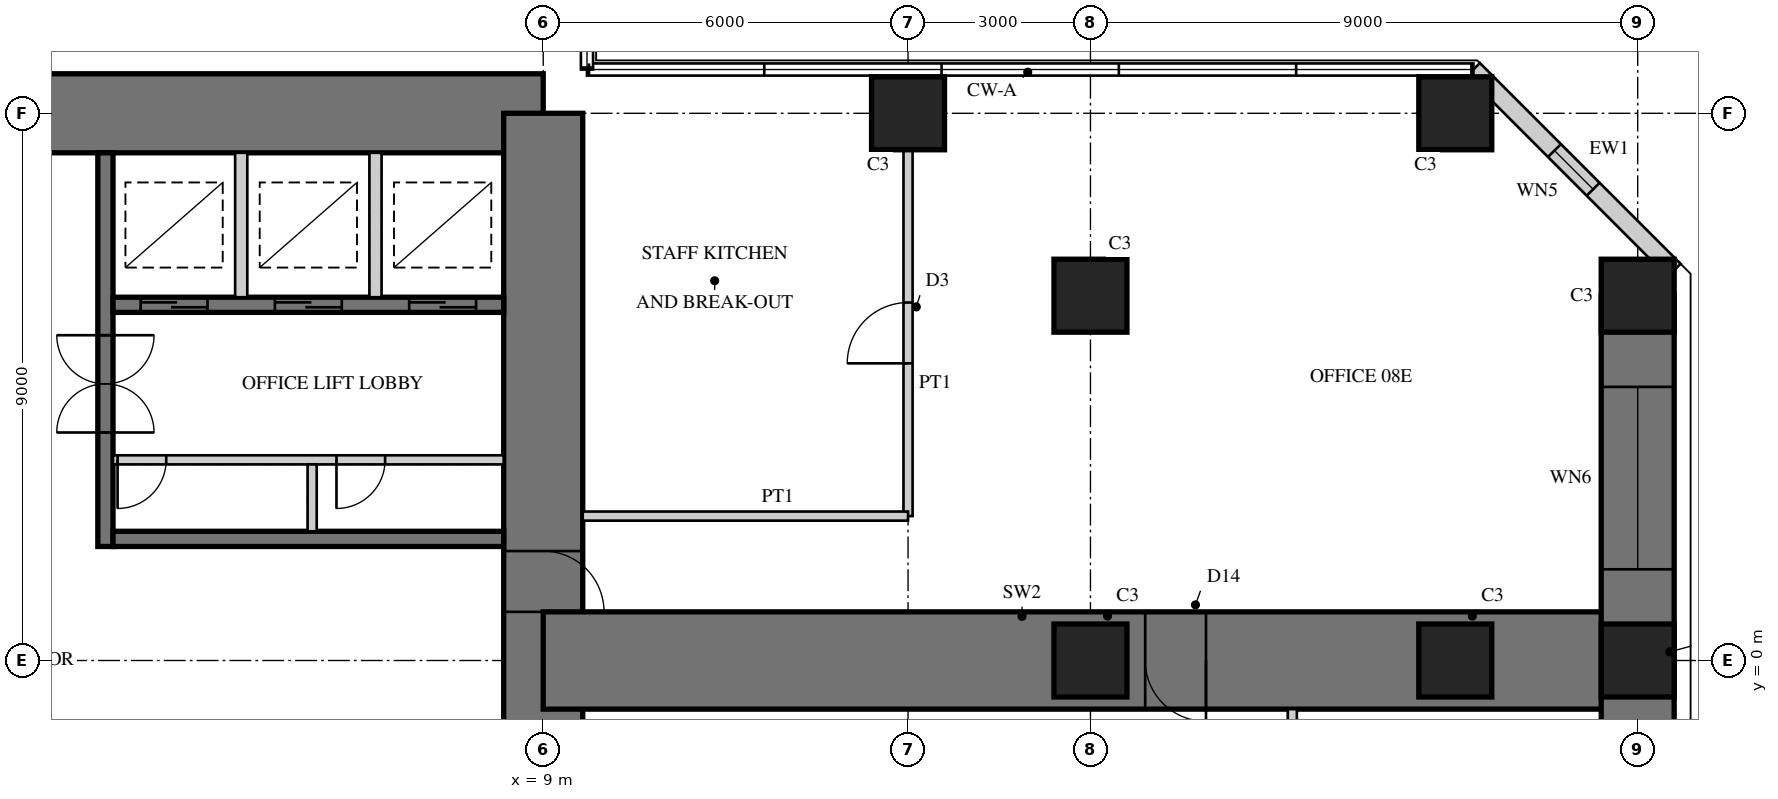
"""IFC4 building model, lengths in metres.
Left out: names, types, materials, properties, quantities, classifications, styles, units other than length and angle.
Written with IfcOpenShell. Run it as: python <this file> out.ifc"""

import sys

from ifc_helpers import new_model, si_unit, direction, frame, frame_2d, origin, origin_2d, place, context, subcontext, project, spatial, rectangle, hollow_rectangle, extrude, element, fill, save


model = new_model("IFC4")
c1 = context("Model", 3, precision=1e-05, world=origin(), true_north=direction((0.0, 1.0)))
c2 = subcontext(c1, "Body", "Model", "MODEL_VIEW")
j1 = project(units=[si_unit("LENGTHUNIT", "METRE"), si_unit("PLANEANGLEUNIT", "RADIAN")], contexts=[c1])
p1 = place(None, origin())
s1 = spatial("IfcSite", under=j1, at=p1, CompositionType="ELEMENT")
p2 = place(p1, origin())
s2 = spatial("IfcBuilding", under=s1, at=p2, CompositionType="ELEMENT")
p3 = place(p2, frame((0.0, 0.0, 35.5)))
s3 = spatial("IfcBuildingStorey", under=s2, at=p3, CompositionType="ELEMENT", Elevation=35.5)
p4 = place(p3, frame((9.0, 9.0, 0.0), z_axis=(0.0, 0.0, 1.0), x_axis=(-1.0, 0.0, 0.0)))
e1 = element("IfcWall", 1, at=p4, inside=s3, PredefinedType="SHEAR", context=c2, shape_type="SweptSolid", body=[
    extrude(rectangle(XDim=18.0, YDim=1.3, at=frame_2d((9.0, 0.0))), origin(), (0.0, 0.0, 1.0), 4.0),
])
p5 = place(p4, frame((9.8, 0.0, 0.0)))
e2 = element("IfcOpeningElement", 2, at=p5, cuts=e1, PredefinedType="OPENING", context=c2, shape_type="SweptSolid", body=[
    extrude(rectangle(XDim=1.0, YDim=2.4, at=frame_2d((0.5, 1.2))), frame((0.0, 0.66, 0.0), z_axis=(0.0, -1.0, 0.0), x_axis=(1.0, 0.0, 0.0)), (0.0, 0.0, 1.0), 1.32),
])
p6 = place(p3, frame((9.0, -9.0, 0.0), z_axis=(0.0, 0.0, 1.0), x_axis=(0.0, 1.0, 0.0)))
e3 = element("IfcWall", 3, at=p6, inside=s3, PredefinedType="SHEAR", context=c2, shape_type="SweptSolid", body=[
    extrude(rectangle(XDim=18.0, YDim=1.3, at=frame_2d((9.0, 0.0))), origin(), (0.0, 0.0, 1.0), 4.0),
])
p7 = place(p6, frame((9.8, 0.0, 0.0)))
e4 = element("IfcOpeningElement", 4, at=p7, cuts=e3, PredefinedType="OPENING", context=c2, shape_type="SweptSolid", body=[
    extrude(rectangle(XDim=1.0, YDim=2.4, at=frame_2d((0.5, 1.2))), frame((0.0, 0.66, 0.0), z_axis=(0.0, -1.0, 0.0), x_axis=(1.0, 0.0, 0.0)), (0.0, 0.0, 1.0), 1.32),
])
p8 = place(p3, frame((1.8, 1.875, 0.0), z_axis=(0.0, 0.0, 1.0), x_axis=(0.0, 1.0, 0.0)))
e5 = element("IfcWall", 5, at=p8, inside=s3, PredefinedType="SHEAR", context=c2, shape_type="SweptSolid", body=[
    extrude(rectangle(XDim=6.475, YDim=0.25, at=frame_2d((3.238, 0.0))), origin(), (0.0, 0.0, 1.0), 4.0),
])
p9 = place(p8, frame((1.875, 0.0, 0.0)))
e6 = element("IfcOpeningElement", 6, at=p9, cuts=e5, PredefinedType="OPENING", context=c2, shape_type="SweptSolid", body=[
    extrude(rectangle(XDim=1.6, YDim=2.4, at=frame_2d((0.8, 1.2))), frame((0.0, 0.135, 0.0), z_axis=(0.0, -1.0, 0.0), x_axis=(1.0, 0.0, 0.0)), (0.0, 0.0, 1.0), 0.27),
])
p10 = place(p3, frame((1.925, 2.0, 0.0), z_axis=(0.0, 0.0, 1.0), x_axis=(1.0, 0.0, 0.0)))
e7 = element("IfcWall", 7, at=p10, inside=s3, PredefinedType="SHEAR", context=c2, shape_type="SweptSolid", body=[
    extrude(rectangle(XDim=6.425, YDim=0.25, at=frame_2d((3.212, 0.0))), origin(), (0.0, 0.0, 1.0), 4.0),
])
p11 = place(p3, frame((1.925, 5.85, 0.0), z_axis=(0.0, 0.0, 1.0), x_axis=(1.0, 0.0, 0.0)))
e8 = element("IfcWall", 8, at=p11, inside=s3, PredefinedType="SHEAR", context=c2, shape_type="SweptSolid", body=[
    extrude(rectangle(XDim=6.425, YDim=0.25, at=frame_2d((3.212, 0.0))), origin(), (0.0, 0.0, 1.0), 4.0),
])
p12 = place(p11, frame((0.454, 0.0, 0.0)))
e9 = element("IfcOpeningElement", 9, at=p12, cuts=e8, PredefinedType="OPENING", context=c2, shape_type="SweptSolid", body=[
    extrude(rectangle(XDim=1.1, YDim=2.2, at=frame_2d((0.55, 1.1))), frame((0.0, 0.135, 0.0), z_axis=(0.0, -1.0, 0.0), x_axis=(1.0, 0.0, 0.0)), (0.0, 0.0, 1.0), 0.27),
])
p13 = place(p11, frame((2.663, 0.0, 0.0)))
e10 = element("IfcOpeningElement", 10, at=p13, cuts=e8, PredefinedType="OPENING", context=c2, shape_type="SweptSolid", body=[
    extrude(rectangle(XDim=1.1, YDim=2.2, at=frame_2d((0.55, 1.1))), frame((0.0, 0.135, 0.0), z_axis=(0.0, -1.0, 0.0), x_axis=(1.0, 0.0, 0.0)), (0.0, 0.0, 1.0), 0.27),
])
p14 = place(p11, frame((4.871, 0.0, 0.0)))
e11 = element("IfcOpeningElement", 11, at=p14, cuts=e8, PredefinedType="OPENING", context=c2, shape_type="SweptSolid", body=[
    extrude(rectangle(XDim=1.1, YDim=2.2, at=frame_2d((0.55, 1.1))), frame((0.0, 0.135, 0.0), z_axis=(0.0, -1.0, 0.0), x_axis=(1.0, 0.0, 0.0)), (0.0, 0.0, 1.0), 0.27),
])
p15 = place(p3, frame((1.925, 3.3, 0.0), z_axis=(0.0, 0.0, 1.0), x_axis=(1.0, 0.0, 0.0)))
e12 = element("IfcWall", 12, at=p15, inside=s3, PredefinedType="PARTITIONING", context=c2, shape_type="SweptSolid", body=[
    extrude(rectangle(XDim=6.425, YDim=0.15, at=frame_2d((3.212, 0.0))), origin(), (0.0, 0.0, 1.0), 4.0),
])
p16 = place(p15, frame((0.075, 0.0, 0.0)))
e13 = element("IfcOpeningElement", 13, at=p16, cuts=e12, PredefinedType="OPENING", context=c2, shape_type="SweptSolid", body=[
    extrude(rectangle(XDim=0.8, YDim=2.1, at=frame_2d((0.4, 1.05))), frame((0.0, 0.085, 0.0), z_axis=(0.0, -1.0, 0.0), x_axis=(1.0, 0.0, 0.0)), (0.0, 0.0, 1.0), 0.17),
])
p17 = place(p15, frame((3.675, 0.0, 0.0)))
e14 = element("IfcOpeningElement", 14, at=p17, cuts=e12, PredefinedType="OPENING", context=c2, shape_type="SweptSolid", body=[
    extrude(rectangle(XDim=0.8, YDim=2.1, at=frame_2d((0.4, 1.05))), frame((0.0, 0.085, 0.0), z_axis=(0.0, -1.0, 0.0), x_axis=(1.0, 0.0, 0.0)), (0.0, 0.0, 1.0), 0.17),
])
p18 = place(p3, frame((5.2, 2.125, 0.0), z_axis=(0.0, 0.0, 1.0), x_axis=(0.0, 1.0, 0.0)))
e15 = element("IfcWall", 15, at=p18, inside=s3, PredefinedType="PARTITIONING", context=c2, shape_type="SweptSolid", body=[
    extrude(rectangle(XDim=1.1, YDim=0.15, at=frame_2d((0.55, 0.0))), origin(), (0.0, 0.0, 1.0), 4.0),
])
for number, where, z_axis, x_axis in (
    (16, (4.033, 5.975, 0.0), (0.0, 0.0, 1.0), (0.0, 1.0, 0.0)),
    (17, (6.242, 5.975, 0.0), (0.0, 0.0, 1.0), (0.0, 1.0, 0.0)),
):
    element("IfcWall", number, at=place(p3, frame(where, z_axis=z_axis, x_axis=x_axis)), inside=s3, PredefinedType="PARTITIONING", context=c2, shape_type="SweptSolid", body=[
        extrude(rectangle(XDim=2.375, YDim=0.2, at=frame_2d((1.188, 0.0))), origin(), (0.0, 0.0, 1.0), 4.0),
    ])
p19 = place(p3, frame((9.0, 0.0, 0.0), z_axis=(0.0, 0.0, 1.0), x_axis=(1.0, 0.0, 0.0)))
e18 = element("IfcWall", 18, at=p19, inside=s3, PredefinedType="SHEAR", context=c2, shape_type="SweptSolid", body=[
    extrude(rectangle(XDim=18.0, YDim=1.6, at=frame_2d((9.0, 0.0))), origin(), (0.0, 0.0, 1.0), 4.0),
])
p20 = place(p19, frame((9.9, 0.0, 0.0)))
e19 = element("IfcOpeningElement", 19, at=p20, cuts=e18, PredefinedType="OPENING", context=c2, shape_type="SweptSolid", body=[
    extrude(rectangle(XDim=1.0, YDim=2.2, at=frame_2d((0.5, 1.1))), frame((0.0, 0.81, 0.0), z_axis=(0.0, -1.0, 0.0), x_axis=(1.0, 0.0, 0.0)), (0.0, 0.0, 1.0), 1.62),
])
p21 = place(p3, frame((27.0, -6.0, 0.0), z_axis=(0.0, 0.0, 1.0), x_axis=(0.0, 1.0, 0.0)))
e20 = element("IfcWall", 20, at=p21, inside=s3, PredefinedType="SHEAR", context=c2, shape_type="SweptSolid", body=[
    extrude(rectangle(XDim=12.0, YDim=1.2, at=frame_2d((6.0, 0.0))), origin(), (0.0, 0.0, 1.0), 4.0),
])
p22 = place(p21, frame((1.5, 0.0, 0.6)))
e21 = element("IfcOpeningElement", 21, at=p22, cuts=e20, PredefinedType="OPENING", context=c2, shape_type="SweptSolid", body=[
    extrude(rectangle(XDim=3.0, YDim=2.4, at=frame_2d((1.5, 1.2))), frame((0.0, 0.61, 0.0), z_axis=(0.0, -1.0, 0.0), x_axis=(1.0, 0.0, 0.0)), (0.0, 0.0, 1.0), 1.22),
])
p23 = place(p21, frame((7.5, 0.0, 0.6)))
e22 = element("IfcOpeningElement", 22, at=p23, cuts=e20, PredefinedType="OPENING", context=c2, shape_type="SweptSolid", body=[
    extrude(rectangle(XDim=3.0, YDim=2.4, at=frame_2d((1.5, 1.2))), frame((0.0, 0.61, 0.0), z_axis=(0.0, -1.0, 0.0), x_axis=(1.0, 0.0, 0.0)), (0.0, 0.0, 1.0), 1.22),
])
for number, where, z_axis, x_axis in (
    (23, (15.0, 9.0, 0.0), (0.0, 0.0, 1.0), (1.0, 0.0, 0.0)),
    (24, (24.0, 9.0, 0.0), (0.0, 0.0, 1.0), (1.0, 0.0, 0.0)),
    (25, (27.0, 0.0, 0.0), (0.0, 0.0, 1.0), (1.0, 0.0, 0.0)),
    (26, (27.0, 6.0, 0.0), (0.0, 0.0, 1.0), (1.0, 0.0, 0.0)),
    (27, (18.0, 0.0, 0.0), (0.0, 0.0, 1.0), (1.0, 0.0, 0.0)),
    (28, (18.0, 6.0, 0.0), (0.0, 0.0, 1.0), (1.0, 0.0, 0.0)),
    (29, (24.0, 0.0, 0.0), (0.0, 0.0, 1.0), (1.0, 0.0, 0.0)),
):
    element("IfcColumn", number, at=place(p3, frame(where, z_axis=z_axis, x_axis=x_axis)), inside=s3, PredefinedType="COLUMN", context=c2, shape_type="SweptSolid", body=[
        extrude(rectangle(XDim=1.2, YDim=1.2, at=origin_2d()), origin(), (0.0, 0.0, 1.0), 4.0),
    ])
p24 = place(p3, frame((27.6, 6.418, 0.0), z_axis=(0.0, 0.0, 1.0), x_axis=(-0.707106781187, 0.707106781187, 0.0)))
e30 = element("IfcWall", 30, at=p24, inside=s3, PredefinedType="SOLIDWALL", context=c2, shape_type="SweptSolid", body=[
    extrude(rectangle(XDim=4.669, YDim=0.3, at=frame_2d((2.335, 0.0))), origin(), (0.0, 0.0, 1.0), 3.8),
])
p25 = place(p24, frame((1.885, 0.0, 0.3)))
e31 = element("IfcOpeningElement", 31, at=p25, cuts=e30, PredefinedType="OPENING", context=c2, shape_type="SweptSolid", body=[
    extrude(rectangle(XDim=0.9, YDim=2.4, at=frame_2d((0.45, 1.2))), frame((0.0, 0.16, 0.0), z_axis=(0.0, -1.0, 0.0), x_axis=(1.0, 0.0, 0.0)), (0.0, 0.0, 1.0), 0.32),
])
p26 = place(p3, frame((15.0, 2.375, 0.0), z_axis=(0.0, 0.0, 1.0), x_axis=(0.0, 1.0, 0.0)))
e32 = element("IfcWall", 32, at=p26, inside=s3, PredefinedType="PARTITIONING", context=c2, shape_type="SweptSolid", body=[
    extrude(rectangle(XDim=6.025, YDim=0.15, at=frame_2d((3.012, 0.0))), origin(), (0.0, 0.0, 1.0), 2.95),
])
p27 = place(p26, frame((2.512, 0.0, 0.0)))
e33 = element("IfcOpeningElement", 33, at=p27, cuts=e32, PredefinedType="OPENING", context=c2, shape_type="SweptSolid", body=[
    extrude(rectangle(XDim=1.0, YDim=2.1, at=frame_2d((0.5, 1.05))), frame((0.0, 0.085, 0.0), z_axis=(0.0, -1.0, 0.0), x_axis=(1.0, 0.0, 0.0)), (0.0, 0.0, 1.0), 0.17),
])
p28 = place(p3, frame((9.65, 2.375, 0.0), z_axis=(0.0, 0.0, 1.0), x_axis=(1.0, 0.0, 0.0)))
e34 = element("IfcWall", 34, at=p28, inside=s3, PredefinedType="PARTITIONING", context=c2, shape_type="SweptSolid", body=[
    extrude(rectangle(XDim=5.35, YDim=0.15, at=frame_2d((2.675, 0.0))), origin(), (0.0, 0.0, 1.0), 3.8),
])
p29 = place(p3, frame((21.32, -9.68, 0.0), z_axis=(0.0, 0.0, 1.0), x_axis=(0.0, 1.0, 0.0)))
e35 = element("IfcWall", 35, at=p29, inside=s3, PredefinedType="PARTITIONING", context=c2, shape_type="SweptSolid", body=[
    extrude(rectangle(XDim=8.88, YDim=0.15, at=frame_2d((4.44, 0.0))), origin(), (0.0, 0.0, 1.0), 3.8),
])
p30 = place(p29, frame((7.43, 0.0, 0.0)))
e36 = element("IfcOpeningElement", 36, at=p30, cuts=e35, PredefinedType="OPENING", context=c2, shape_type="SweptSolid", body=[
    extrude(rectangle(XDim=1.0, YDim=2.2, at=frame_2d((0.5, 1.1))), frame((0.0, 0.085, 0.0), z_axis=(0.0, -1.0, 0.0), x_axis=(1.0, 0.0, 0.0)), (0.0, 0.0, 1.0), 0.17),
])
p31 = place(p23, origin())
e37 = element("IfcWindow", 37, at=p31, inside=s3, PartitioningType="SINGLE_PANEL", PredefinedType="WINDOW", context=c2, shape_type="SweptSolid", body=[
    extrude(hollow_rectangle(XDim=3.0, YDim=2.4, WallThickness=0.06, at=frame_2d((1.5, 1.2))), frame((0.0, 0.03, 0.0), z_axis=(0.0, -1.0, 0.0), x_axis=(1.0, 0.0, 0.0)), (0.0, 0.0, 1.0), 0.06),
    extrude(rectangle(XDim=2.879, YDim=2.279, at=frame_2d((1.5, 1.2))), frame((0.0, 0.03, 0.0), z_axis=(0.0, -1.0, 0.0), x_axis=(1.0, 0.0, 0.0)), (0.0, 0.0, 1.0), 0.06),
])
fill(e22, e37)
p32 = place(p25, origin())
e38 = element("IfcWindow", 38, at=p32, inside=s3, PartitioningType="SINGLE_PANEL", PredefinedType="WINDOW", context=c2, shape_type="SweptSolid", body=[
    extrude(hollow_rectangle(XDim=0.9, YDim=2.4, WallThickness=0.06, at=frame_2d((0.45, 1.2))), frame((0.0, 0.03, 0.0), z_axis=(0.0, -1.0, 0.0), x_axis=(1.0, 0.0, 0.0)), (0.0, 0.0, 1.0), 0.06),
    extrude(rectangle(XDim=0.779, YDim=2.279, at=frame_2d((0.45, 1.2))), frame((0.0, 0.03, 0.0), z_axis=(0.0, -1.0, 0.0), x_axis=(1.0, 0.0, 0.0)), (0.0, 0.0, 1.0), 0.06),
])
fill(e31, e38)
p33 = place(p27, origin())
e39 = element("IfcDoor", 39, at=p33, inside=s3, OperationType="SINGLE_SWING_LEFT", PredefinedType="DOOR", context=c2, shape_type="SweptSolid", body=[
    extrude(rectangle(XDim=1.0, YDim=2.1, at=frame_2d((0.5, 1.05))), frame((0.0, 0.025, 0.0), z_axis=(0.0, -1.0, 0.0), x_axis=(1.0, 0.0, 0.0)), (0.0, 0.0, 1.0), 0.05),
])
fill(e33, e39)
p34 = place(p20, frame((1.0, 0.0, 0.0), z_axis=(0.0, 0.0, 1.0), x_axis=(-1.0, 0.0, 0.0)))
e40 = element("IfcDoor", 40, at=p34, inside=s3, OperationType="SINGLE_SWING_LEFT", PredefinedType="DOOR", context=c2, shape_type="SweptSolid", body=[
    extrude(rectangle(XDim=1.0, YDim=2.2, at=frame_2d((0.5, 1.1))), frame((0.0, 0.025, 0.0), z_axis=(0.0, -1.0, 0.0), x_axis=(1.0, 0.0, 0.0)), (0.0, 0.0, 1.0), 0.05),
])
fill(e19, e40)
p35 = place(p7, frame((1.0, 0.0, 0.0), z_axis=(0.0, 0.0, 1.0), x_axis=(-1.0, 0.0, 0.0)))
e41 = element("IfcDoor", 41, at=p35, inside=s3, OperationType="SINGLE_SWING_RIGHT", PredefinedType="DOOR", context=c2, shape_type="SweptSolid", body=[
    extrude(rectangle(XDim=1.0, YDim=2.4, at=frame_2d((0.5, 1.2))), frame((0.0, -0.005, 0.0), z_axis=(0.0, -1.0, 0.0), x_axis=(1.0, 0.0, 0.0)), (0.0, 0.0, 1.0), 0.05),
])
fill(e4, e41)
p36 = place(p12, origin())
e42 = element("IfcDoor", 42, at=p36, inside=s3, OperationType="DOUBLE_DOOR_SLIDING", PredefinedType="DOOR", context=c2, shape_type="SweptSolid", body=[
    extrude(rectangle(XDim=1.1, YDim=2.2, at=frame_2d((0.55, 1.1))), frame((0.0, 0.025, 0.0), z_axis=(0.0, -1.0, 0.0), x_axis=(1.0, 0.0, 0.0)), (0.0, 0.0, 1.0), 0.05),
])
fill(e9, e42)
p37 = place(p13, origin())
e43 = element("IfcDoor", 43, at=p37, inside=s3, OperationType="DOUBLE_DOOR_SLIDING", PredefinedType="DOOR", context=c2, shape_type="SweptSolid", body=[
    extrude(rectangle(XDim=1.1, YDim=2.2, at=frame_2d((0.55, 1.1))), frame((0.0, 0.025, 0.0), z_axis=(0.0, -1.0, 0.0), x_axis=(1.0, 0.0, 0.0)), (0.0, 0.0, 1.0), 0.05),
])
fill(e10, e43)
p38 = place(p14, origin())
e44 = element("IfcDoor", 44, at=p38, inside=s3, OperationType="DOUBLE_DOOR_SLIDING", PredefinedType="DOOR", context=c2, shape_type="SweptSolid", body=[
    extrude(rectangle(XDim=1.1, YDim=2.2, at=frame_2d((0.55, 1.1))), frame((0.0, 0.025, 0.0), z_axis=(0.0, -1.0, 0.0), x_axis=(1.0, 0.0, 0.0)), (0.0, 0.0, 1.0), 0.05),
])
fill(e11, e44)
p39 = place(p9, origin())
e45 = element("IfcDoor", 45, at=p39, inside=s3, OperationType="DOUBLE_DOOR_DOUBLE_SWING", PredefinedType="DOOR", context=c2, shape_type="SweptSolid", body=[
    extrude(rectangle(XDim=1.6, YDim=2.4, at=frame_2d((0.8, 1.2))), frame((0.0, 0.025, 0.0), z_axis=(0.0, -1.0, 0.0), x_axis=(1.0, 0.0, 0.0)), (0.0, 0.0, 1.0), 0.05),
])
fill(e6, e45)
p40 = place(p16, frame((0.8, 0.0, 0.0), z_axis=(0.0, 0.0, 1.0), x_axis=(-1.0, 0.0, 0.0)))
e46 = element("IfcDoor", 46, at=p40, inside=s3, OperationType="SINGLE_SWING_RIGHT", PredefinedType="DOOR", context=c2, shape_type="SweptSolid", body=[
    extrude(rectangle(XDim=0.8, YDim=2.1, at=frame_2d((0.4, 1.05))), frame((0.0, 0.025, 0.0), z_axis=(0.0, -1.0, 0.0), x_axis=(1.0, 0.0, 0.0)), (0.0, 0.0, 1.0), 0.05),
])
fill(e13, e46)
p41 = place(p17, frame((0.8, 0.0, 0.0), z_axis=(0.0, 0.0, 1.0), x_axis=(-1.0, 0.0, 0.0)))
e47 = element("IfcDoor", 47, at=p41, inside=s3, OperationType="SINGLE_SWING_RIGHT", PredefinedType="DOOR", context=c2, shape_type="SweptSolid", body=[
    extrude(rectangle(XDim=0.8, YDim=2.1, at=frame_2d((0.4, 1.05))), frame((0.0, 0.025, 0.0), z_axis=(0.0, -1.0, 0.0), x_axis=(1.0, 0.0, 0.0)), (0.0, 0.0, 1.0), 0.05),
])
fill(e14, e47)
save(model, sys.argv[1])
